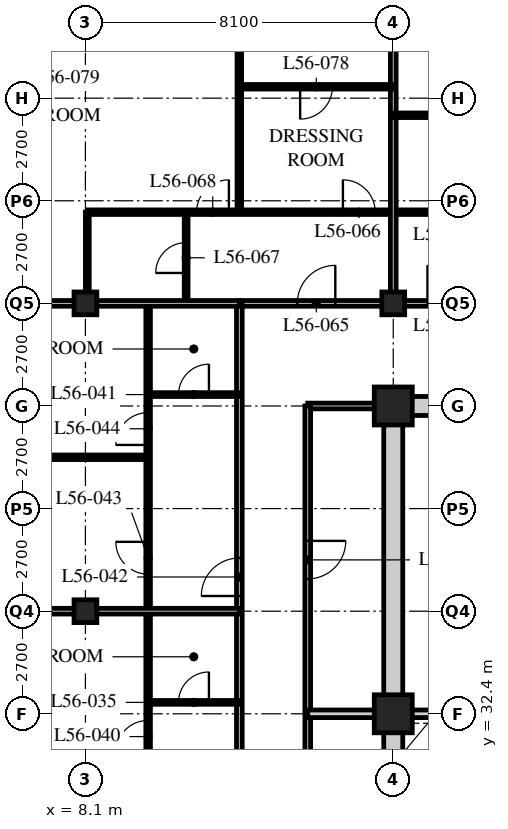
"""IFC4 building model, lengths in metres.
Left out: names, types, materials, properties, quantities, classifications, styles, units other than length and angle.
Written with IfcOpenShell. Run it as: python <this file> out.ifc"""

import sys

from ifc_helpers import new_model, si_unit, direction, frame, frame_2d, origin, origin_2d, place, context, subcontext, project, spatial, rectangle, hollow_rectangle, extrude, element, fill, save


model = new_model("IFC4")
c1 = context("Model", 3, precision=1e-05, world=origin(), true_north=direction((0.0, 1.0)))
c2 = subcontext(c1, "Body", "Model", "MODEL_VIEW")
j1 = project(units=[si_unit("LENGTHUNIT", "METRE"), si_unit("PLANEANGLEUNIT", "RADIAN")], contexts=[c1])
p1 = place(None, origin())
s1 = spatial("IfcSite", under=j1, at=p1, CompositionType="ELEMENT")
p2 = place(p1, origin())
s2 = spatial("IfcBuilding", under=s1, at=p2, CompositionType="ELEMENT")
p3 = place(p2, frame((0.0, 0.0, 217.2)))
s3 = spatial("IfcBuildingStorey", under=s2, at=p3, CompositionType="ELEMENT", Elevation=217.2)
for number, where, z_axis, x_axis in (
    (1, (8.1, 35.1, 0.0), (0.0, 0.0, 1.0), (1.0, 0.0, 0.0)),
    (2, (8.1, 43.2, 0.0), (0.0, 0.0, 1.0), (1.0, 0.0, 0.0)),
):
    element("IfcColumn", number, at=place(p3, frame(where, z_axis=z_axis, x_axis=x_axis)), inside=s3, PredefinedType="COLUMN", context=c2, shape_type="SweptSolid", body=[
        extrude(hollow_rectangle(XDim=0.6, YDim=0.6, WallThickness=0.05, at=origin_2d()), origin(), (0.0, 0.0, 1.0), 3.6),
    ])
for number, where, z_axis, x_axis in (
    (3, (16.2, 32.4, 0.0), (0.0, 0.0, 1.0), (1.0, 0.0, 0.0)),
    (4, (16.2, 40.5, 0.0), (0.0, 0.0, 1.0), (1.0, 0.0, 0.0)),
):
    element("IfcColumn", number, at=place(p3, frame(where, z_axis=z_axis, x_axis=x_axis)), inside=s3, PredefinedType="COLUMN", context=c2, shape_type="SweptSolid", body=[
        extrude(hollow_rectangle(XDim=1.0, YDim=1.0, WallThickness=0.1, at=origin_2d()), origin(), (0.0, 0.0, 1.0), 3.6),
    ])
p4 = place(p3, frame((16.2, 43.2, 0.0), z_axis=(0.0, 0.0, 1.0), x_axis=(1.0, 0.0, 0.0)))
e5 = element("IfcColumn", 5, at=p4, inside=s3, PredefinedType="COLUMN", context=c2, shape_type="SweptSolid", body=[
    extrude(hollow_rectangle(XDim=0.6, YDim=0.6, WallThickness=0.05, at=origin_2d()), origin(), (0.0, 0.0, 1.0), 3.6),
])
p5 = place(p3, frame((12.15, 43.2, 0.0), z_axis=(0.0, 0.0, 1.0), x_axis=(1.0, 0.0, 0.0)))
e6 = element("IfcWall", 6, at=p5, inside=s3, PredefinedType="PARTITIONING", context=c2, shape_type="SweptSolid", body=[
    extrude(rectangle(XDim=36.45, YDim=0.15, at=frame_2d((18.225, 0.0))), origin(), (0.0, 0.0, 1.0), 2.778),
])
p6 = place(p5, frame((4.95, 0.0, 0.0)))
e7 = element("IfcOpeningElement", 7, at=p6, cuts=e6, PredefinedType="OPENING", context=c2, shape_type="SweptSolid", body=[
    extrude(rectangle(XDim=1.0, YDim=2.1, at=frame_2d((0.5, 1.05))), frame((0.0, 0.085, 0.0), z_axis=(0.0, -1.0, 0.0), x_axis=(1.0, 0.0, 0.0)), (0.0, 0.0, 1.0), 0.17),
])
p7 = place(p5, frame((25.0, 0.0, 0.0)))
e8 = element("IfcOpeningElement", 8, at=p7, cuts=e6, PredefinedType="OPENING", context=c2, shape_type="SweptSolid", body=[
    extrude(rectangle(XDim=1.0, YDim=2.1, at=frame_2d((0.5, 1.05))), frame((0.0, 0.085, 0.0), z_axis=(0.0, -1.0, 0.0), x_axis=(1.0, 0.0, 0.0)), (0.0, 0.0, 1.0), 0.17),
])
p8 = place(p5, frame((30.7, 0.0, 0.0)))
e9 = element("IfcOpeningElement", 9, at=p8, cuts=e6, PredefinedType="OPENING", context=c2, shape_type="SweptSolid", body=[
    extrude(rectangle(XDim=1.0, YDim=2.1, at=frame_2d((0.5, 1.05))), frame((0.0, 0.085, 0.0), z_axis=(0.0, -1.0, 0.0), x_axis=(1.0, 0.0, 0.0)), (0.0, 0.0, 1.0), 0.17),
])
p9 = place(p5, frame((33.925, 0.0, 0.0)))
e10 = element("IfcOpeningElement", 10, at=p9, cuts=e6, PredefinedType="OPENING", context=c2, shape_type="SweptSolid", body=[
    extrude(rectangle(XDim=1.0, YDim=2.1, at=frame_2d((0.5, 1.05))), frame((0.0, 0.085, 0.0), z_axis=(0.0, -1.0, 0.0), x_axis=(1.0, 0.0, 0.0)), (0.0, 0.0, 1.0), 0.17),
])
p10 = place(p5, frame((1.525, 0.0, 0.0)))
e11 = element("IfcOpeningElement", 11, at=p10, cuts=e6, PredefinedType="OPENING", context=c2, shape_type="SweptSolid", body=[
    extrude(rectangle(XDim=1.0, YDim=2.1, at=frame_2d((0.5, 1.05))), frame((0.0, 0.085, 0.0), z_axis=(0.0, -1.0, 0.0), x_axis=(1.0, 0.0, 0.0)), (0.0, 0.0, 1.0), 0.17),
])
p11 = place(p3, frame((12.15, 18.9, 0.0), z_axis=(0.0, 0.0, 1.0), x_axis=(0.0, 1.0, 0.0)))
e12 = element("IfcWall", 12, at=p11, inside=s3, PredefinedType="PARTITIONING", context=c2, shape_type="SweptSolid", body=[
    extrude(rectangle(XDim=24.3, YDim=0.15, at=frame_2d((12.15, 0.0))), origin(), (0.0, 0.0, 1.0), 3.39),
])
p12 = place(p11, frame((0.4, 0.0, 0.0)))
e13 = element("IfcOpeningElement", 13, at=p12, cuts=e12, PredefinedType="OPENING", context=c2, shape_type="SweptSolid", body=[
    extrude(rectangle(XDim=1.0, YDim=2.1, at=frame_2d((0.5, 1.05))), frame((0.0, 0.085, 0.0), z_axis=(0.0, -1.0, 0.0), x_axis=(1.0, 0.0, 0.0)), (0.0, 0.0, 1.0), 0.17),
])
p13 = place(p11, frame((16.6, 0.0, 0.0)))
e14 = element("IfcOpeningElement", 14, at=p13, cuts=e12, PredefinedType="OPENING", context=c2, shape_type="SweptSolid", body=[
    extrude(rectangle(XDim=1.0, YDim=2.1, at=frame_2d((0.5, 1.05))), frame((0.0, 0.085, 0.0), z_axis=(0.0, -1.0, 0.0), x_axis=(1.0, 0.0, 0.0)), (0.0, 0.0, 1.0), 0.17),
])
p14 = place(p3, frame((16.0, 40.5, 0.0), z_axis=(0.0, 0.0, 1.0), x_axis=(-1.0, 0.0, 0.0)))
e15 = element("IfcWall", 15, at=p14, inside=s3, PredefinedType="PARTITIONING", context=c2, shape_type="SweptSolid", body=[
    extrude(rectangle(XDim=2.05, YDim=0.15, at=frame_2d((1.025, 0.0))), origin(), (0.0, 0.0, 1.0), 3.39),
])
p15 = place(p3, frame((13.95, 40.5, 0.0), z_axis=(0.0, 0.0, 1.0), x_axis=(0.0, -1.0, 0.0)))
e16 = element("IfcWall", 16, at=p15, inside=s3, PredefinedType="PARTITIONING", context=c2, shape_type="SweptSolid", body=[
    extrude(rectangle(XDim=19.8, YDim=0.15, at=frame_2d((9.9, 0.0))), origin(), (0.0, 0.0, 1.0), 3.39),
])
p16 = place(p15, frame((11.65, 0.0, 0.0)))
e17 = element("IfcOpeningElement", 17, at=p16, cuts=e16, PredefinedType="OPENING", context=c2, shape_type="SweptSolid", body=[
    extrude(rectangle(XDim=1.0, YDim=2.1, at=frame_2d((0.5, 1.05))), frame((0.0, 0.085, 0.0), z_axis=(0.0, -1.0, 0.0), x_axis=(1.0, 0.0, 0.0)), (0.0, 0.0, 1.0), 0.17),
])
p17 = place(p15, frame((3.55, 0.0, 0.0)))
e18 = element("IfcOpeningElement", 18, at=p17, cuts=e16, PredefinedType="OPENING", context=c2, shape_type="SweptSolid", body=[
    extrude(rectangle(XDim=1.0, YDim=2.1, at=frame_2d((0.5, 1.05))), frame((0.0, 0.085, 0.0), z_axis=(0.0, -1.0, 0.0), x_axis=(1.0, 0.0, 0.0)), (0.0, 0.0, 1.0), 0.17),
])
p18 = place(p3, frame((13.95, 32.4, 0.0), z_axis=(0.0, 0.0, 1.0), x_axis=(1.0, 0.0, 0.0)))
e19 = element("IfcWall", 19, at=p18, inside=s3, PredefinedType="SOLIDWALL", context=c2, shape_type="SweptSolid", body=[
    extrude(rectangle(XDim=2.25, YDim=0.2, at=frame_2d((1.125, 0.0))), origin(), (0.0, 0.0, 1.0), 3.39),
])
p19 = place(p3, frame((9.75, 18.9, 0.0), z_axis=(0.0, 0.0, 1.0), x_axis=(0.0, 1.0, 0.0)))
e20 = element("IfcWall", 20, at=p19, inside=s3, PredefinedType="PARTITIONING", context=c2, shape_type="SweptSolid", body=[
    extrude(rectangle(XDim=24.3, YDim=0.12, at=frame_2d((12.15, 0.0))), origin(), (0.0, 0.0, 1.0), 3.39),
])
p20 = place(p19, frame((0.975, 0.0, 0.0)))
e21 = element("IfcOpeningElement", 21, at=p20, cuts=e20, PredefinedType="OPENING", context=c2, shape_type="SweptSolid", body=[
    extrude(rectangle(XDim=0.85, YDim=2.1, at=frame_2d((0.425, 1.05))), frame((0.0, 0.07, 0.0), z_axis=(0.0, -1.0, 0.0), x_axis=(1.0, 0.0, 0.0)), (0.0, 0.0, 1.0), 0.14),
])
p21 = place(p19, frame((8.425, 0.0, 0.0)))
e22 = element("IfcOpeningElement", 22, at=p21, cuts=e20, PredefinedType="OPENING", context=c2, shape_type="SweptSolid", body=[
    extrude(rectangle(XDim=0.85, YDim=2.1, at=frame_2d((0.425, 1.05))), frame((0.0, 0.07, 0.0), z_axis=(0.0, -1.0, 0.0), x_axis=(1.0, 0.0, 0.0)), (0.0, 0.0, 1.0), 0.14),
])
p22 = place(p19, frame((12.475, 0.0, 0.0)))
e23 = element("IfcOpeningElement", 23, at=p22, cuts=e20, PredefinedType="OPENING", context=c2, shape_type="SweptSolid", body=[
    extrude(rectangle(XDim=0.85, YDim=2.1, at=frame_2d((0.425, 1.05))), frame((0.0, 0.07, 0.0), z_axis=(0.0, -1.0, 0.0), x_axis=(1.0, 0.0, 0.0)), (0.0, 0.0, 1.0), 0.14),
])
p23 = place(p19, frame((17.175, 0.0, 0.0)))
e24 = element("IfcOpeningElement", 24, at=p23, cuts=e20, PredefinedType="OPENING", context=c2, shape_type="SweptSolid", body=[
    extrude(rectangle(XDim=0.85, YDim=2.1, at=frame_2d((0.425, 1.05))), frame((0.0, 0.07, 0.0), z_axis=(0.0, -1.0, 0.0), x_axis=(1.0, 0.0, 0.0)), (0.0, 0.0, 1.0), 0.14),
])
p24 = place(p19, frame((20.575, 0.0, 0.0)))
e25 = element("IfcOpeningElement", 25, at=p24, cuts=e20, PredefinedType="OPENING", context=c2, shape_type="SweptSolid", body=[
    extrude(rectangle(XDim=0.85, YDim=2.1, at=frame_2d((0.425, 1.05))), frame((0.0, 0.07, 0.0), z_axis=(0.0, -1.0, 0.0), x_axis=(1.0, 0.0, 0.0)), (0.0, 0.0, 1.0), 0.14),
])
p25 = place(p3, frame((12.15, 32.7, 0.0), z_axis=(0.0, 0.0, 1.0), x_axis=(-1.0, 0.0, 0.0)))
e26 = element("IfcWall", 26, at=p25, inside=s3, PredefinedType="PARTITIONING", context=c2, shape_type="SweptSolid", body=[
    extrude(rectangle(XDim=2.4, YDim=0.1, at=frame_2d((1.2, 0.0))), origin(), (0.0, 0.0, 1.0), 3.39),
])
p26 = place(p25, frame((0.8, 0.0, 0.0)))
e27 = element("IfcOpeningElement", 27, at=p26, cuts=e26, PredefinedType="OPENING", context=c2, shape_type="SweptSolid", body=[
    extrude(rectangle(XDim=0.8, YDim=2.1, at=frame_2d((0.4, 1.05))), frame((0.0, 0.06, 0.0), z_axis=(0.0, -1.0, 0.0), x_axis=(1.0, 0.0, 0.0)), (0.0, 0.0, 1.0), 0.12),
])
p27 = place(p3, frame((12.15, 35.1, 0.0), z_axis=(0.0, 0.0, 1.0), x_axis=(-1.0, 0.0, 0.0)))
e28 = element("IfcWall", 28, at=p27, inside=s3, PredefinedType="PARTITIONING", context=c2, shape_type="SweptSolid", body=[
    extrude(rectangle(XDim=11.85, YDim=0.15, at=frame_2d((5.925, 0.0))), origin(), (0.0, 0.0, 1.0), 2.778),
])
p28 = place(p3, frame((12.15, 40.8, 0.0), z_axis=(0.0, 0.0, 1.0), x_axis=(-1.0, 0.0, 0.0)))
e29 = element("IfcWall", 29, at=p28, inside=s3, PredefinedType="PARTITIONING", context=c2, shape_type="SweptSolid", body=[
    extrude(rectangle(XDim=2.4, YDim=0.1, at=frame_2d((1.2, 0.0))), origin(), (0.0, 0.0, 1.0), 3.39),
])
p29 = place(p28, frame((0.8, 0.0, 0.0)))
e30 = element("IfcOpeningElement", 30, at=p29, cuts=e29, PredefinedType="OPENING", context=c2, shape_type="SweptSolid", body=[
    extrude(rectangle(XDim=0.8, YDim=2.1, at=frame_2d((0.4, 1.05))), frame((0.0, 0.06, 0.0), z_axis=(0.0, -1.0, 0.0), x_axis=(1.0, 0.0, 0.0)), (0.0, 0.0, 1.0), 0.12),
])
p30 = place(p3, frame((9.75, 39.15, 0.0), z_axis=(0.0, 0.0, 1.0), x_axis=(-1.0, 0.0, 0.0)))
e31 = element("IfcWall", 31, at=p30, inside=s3, PredefinedType="PARTITIONING", context=c2, shape_type="SweptSolid", body=[
    extrude(rectangle(XDim=9.45, YDim=0.12, at=frame_2d((4.725, 0.0))), origin(), (0.0, 0.0, 1.0), 3.39),
])
p31 = place(p3, frame((10.75, 43.2, 0.0), z_axis=(0.0, 0.0, 1.0), x_axis=(0.0, 1.0, 0.0)))
e32 = element("IfcWall", 32, at=p31, inside=s3, PredefinedType="PARTITIONING", context=c2, shape_type="SweptSolid", body=[
    extrude(rectangle(XDim=2.4, YDim=0.1, at=frame_2d((1.2, 0.0))), origin(), (0.0, 0.0, 1.0), 3.39),
])
p32 = place(p31, frame((0.8, 0.0, 0.0)))
e33 = element("IfcOpeningElement", 33, at=p32, cuts=e32, PredefinedType="OPENING", context=c2, shape_type="SweptSolid", body=[
    extrude(rectangle(XDim=0.8, YDim=2.1, at=frame_2d((0.4, 1.05))), frame((0.0, 0.06, 0.0), z_axis=(0.0, -1.0, 0.0), x_axis=(1.0, 0.0, 0.0)), (0.0, 0.0, 1.0), 0.12),
])
p33 = place(p3, frame((8.15, 43.2, 0.0), z_axis=(0.0, 0.0, 1.0), x_axis=(0.0, 1.0, 0.0)))
e34 = element("IfcWall", 34, at=p33, inside=s3, PredefinedType="PARTITIONING", context=c2, shape_type="SweptSolid", body=[
    extrude(rectangle(XDim=2.4, YDim=0.1, at=frame_2d((1.2, 0.0))), origin(), (0.0, 0.0, 1.0), 2.778),
])
p34 = place(p3, frame((8.15, 45.6, 0.0), z_axis=(0.0, 0.0, 1.0), x_axis=(1.0, 0.0, 0.0)))
e35 = element("IfcWall", 35, at=p34, inside=s3, PredefinedType="PARTITIONING", context=c2, shape_type="SweptSolid", body=[
    extrude(rectangle(XDim=28.3, YDim=0.12, at=frame_2d((14.15, 0.0))), origin(), (0.0, 0.0, 1.0), 3.39),
])
p35 = place(p34, frame((9.025, 0.0, 0.0)))
e36 = element("IfcOpeningElement", 36, at=p35, cuts=e35, PredefinedType="OPENING", context=c2, shape_type="SweptSolid", body=[
    extrude(rectangle(XDim=0.85, YDim=2.1, at=frame_2d((0.425, 1.05))), frame((0.0, 0.07, 0.0), z_axis=(0.0, -1.0, 0.0), x_axis=(1.0, 0.0, 0.0)), (0.0, 0.0, 1.0), 0.14),
])
p36 = place(p34, frame((16.475, 0.0, 0.0)))
e37 = element("IfcOpeningElement", 37, at=p36, cuts=e35, PredefinedType="OPENING", context=c2, shape_type="SweptSolid", body=[
    extrude(rectangle(XDim=0.85, YDim=2.1, at=frame_2d((0.425, 1.05))), frame((0.0, 0.07, 0.0), z_axis=(0.0, -1.0, 0.0), x_axis=(1.0, 0.0, 0.0)), (0.0, 0.0, 1.0), 0.14),
])
p37 = place(p34, frame((20.525, 0.0, 0.0)))
e38 = element("IfcOpeningElement", 38, at=p37, cuts=e35, PredefinedType="OPENING", context=c2, shape_type="SweptSolid", body=[
    extrude(rectangle(XDim=0.85, YDim=2.1, at=frame_2d((0.425, 1.05))), frame((0.0, 0.07, 0.0), z_axis=(0.0, -1.0, 0.0), x_axis=(1.0, 0.0, 0.0)), (0.0, 0.0, 1.0), 0.14),
])
p38 = place(p34, frame((24.575, 0.0, 0.0)))
e39 = element("IfcOpeningElement", 39, at=p38, cuts=e35, PredefinedType="OPENING", context=c2, shape_type="SweptSolid", body=[
    extrude(rectangle(XDim=0.85, YDim=2.1, at=frame_2d((0.425, 1.05))), frame((0.0, 0.07, 0.0), z_axis=(0.0, -1.0, 0.0), x_axis=(1.0, 0.0, 0.0)), (0.0, 0.0, 1.0), 0.14),
])
p39 = place(p34, frame((6.725, 0.0, 0.0)))
e40 = element("IfcOpeningElement", 40, at=p39, cuts=e35, PredefinedType="OPENING", context=c2, shape_type="SweptSolid", body=[
    extrude(rectangle(XDim=0.85, YDim=2.1, at=frame_2d((0.425, 1.05))), frame((0.0, 0.07, 0.0), z_axis=(0.0, -1.0, 0.0), x_axis=(1.0, 0.0, 0.0)), (0.0, 0.0, 1.0), 0.14),
])
p40 = place(p34, frame((2.875, 0.0, 0.0)))
e41 = element("IfcOpeningElement", 41, at=p40, cuts=e35, PredefinedType="OPENING", context=c2, shape_type="SweptSolid", body=[
    extrude(rectangle(XDim=0.85, YDim=2.1, at=frame_2d((0.425, 1.05))), frame((0.0, 0.07, 0.0), z_axis=(0.0, -1.0, 0.0), x_axis=(1.0, 0.0, 0.0)), (0.0, 0.0, 1.0), 0.14),
])
p41 = place(p3, frame((12.15, 45.6, 0.0), z_axis=(0.0, 0.0, 1.0), x_axis=(0.0, 1.0, 0.0)))
e42 = element("IfcWall", 42, at=p41, inside=s3, PredefinedType="PARTITIONING", context=c2, shape_type="SweptSolid", body=[
    extrude(rectangle(XDim=13.5, YDim=0.12, at=frame_2d((6.75, 0.0))), origin(), (0.0, 0.0, 1.0), 3.39),
])
p42 = place(p3, frame((0.3, 43.2, 0.0), z_axis=(0.0, 0.0, 1.0), x_axis=(1.0, 0.0, 0.0)))
e43 = element("IfcWall", 43, at=p42, inside=s3, PredefinedType="PARTITIONING", context=c2, shape_type="SweptSolid", body=[
    extrude(rectangle(XDim=11.85, YDim=0.15, at=frame_2d((5.925, 0.0))), origin(), (0.0, 0.0, 1.0), 2.778),
])
p43 = place(p3, frame((16.2, 43.2, 0.0), z_axis=(0.0, 0.0, 1.0), x_axis=(0.0, 1.0, 0.0)))
e44 = element("IfcWall", 44, at=p43, inside=s3, PredefinedType="PARTITIONING", context=c2, shape_type="SweptSolid", body=[
    extrude(rectangle(XDim=15.9, YDim=0.15, at=frame_2d((7.95, 0.0))), origin(), (0.0, 0.0, 1.0), 2.778),
])
p44 = place(p3, frame((16.2, 48.15, 0.0), z_axis=(0.0, 0.0, 1.0), x_axis=(1.0, 0.0, 0.0)))
e45 = element("IfcWall", 45, at=p44, inside=s3, PredefinedType="PARTITIONING", context=c2, shape_type="SweptSolid", body=[
    extrude(rectangle(XDim=8.1, YDim=0.12, at=frame_2d((4.05, 0.0))), origin(), (0.0, 0.0, 1.0), 3.39),
])
p45 = place(p44, frame((3.625, 0.0, 0.0)))
e46 = element("IfcOpeningElement", 46, at=p45, cuts=e45, PredefinedType="OPENING", context=c2, shape_type="SweptSolid", body=[
    extrude(rectangle(XDim=0.85, YDim=2.1, at=frame_2d((0.425, 1.05))), frame((0.0, 0.07, 0.0), z_axis=(0.0, -1.0, 0.0), x_axis=(1.0, 0.0, 0.0)), (0.0, 0.0, 1.0), 0.14),
])
p46 = place(p3, frame((12.15, 48.9, 0.0), z_axis=(0.0, 0.0, 1.0), x_axis=(1.0, 0.0, 0.0)))
e47 = element("IfcWall", 47, at=p46, inside=s3, PredefinedType="PARTITIONING", context=c2, shape_type="SweptSolid", body=[
    extrude(rectangle(XDim=4.05, YDim=0.12, at=frame_2d((2.025, 0.0))), origin(), (0.0, 0.0, 1.0), 3.39),
])
p47 = place(p46, frame((1.6, 0.0, 0.0)))
e48 = element("IfcOpeningElement", 48, at=p47, cuts=e47, PredefinedType="OPENING", context=c2, shape_type="SweptSolid", body=[
    extrude(rectangle(XDim=0.85, YDim=2.1, at=frame_2d((0.425, 1.05))), frame((0.0, 0.07, 0.0), z_axis=(0.0, -1.0, 0.0), x_axis=(1.0, 0.0, 0.0)), (0.0, 0.0, 1.0), 0.14),
])
p48 = place(p3, frame((15.95, 40.5, 0.0), z_axis=(0.0, 0.0, 1.0), x_axis=(1.0, 0.0, 0.0)))
e49 = element("IfcWall", 49, at=p48, inside=s3, PredefinedType="SOLIDWALL", context=c2, shape_type="SweptSolid", body=[
    extrude(rectangle(XDim=24.8, YDim=0.5, at=frame_2d((12.4, 0.0))), origin(), (0.0, 0.0, 1.0), 2.74),
])
p49 = place(p48, frame((11.5, 0.0, 0.0)))
e50 = element("IfcOpeningElement", 50, at=p49, cuts=e49, PredefinedType="OPENING", context=c2, shape_type="SweptSolid", body=[
    extrude(rectangle(XDim=1.8, YDim=2.4, at=frame_2d((0.9, 1.2))), frame((0.0, 0.26, 0.0), z_axis=(0.0, -1.0, 0.0), x_axis=(1.0, 0.0, 0.0)), (0.0, 0.0, 1.0), 0.52),
])
p50 = place(p3, frame((16.2, 24.55, 0.0), z_axis=(0.0, 0.0, 1.0), x_axis=(0.0, 1.0, 0.0)))
e51 = element("IfcWall", 51, at=p50, inside=s3, PredefinedType="SOLIDWALL", context=c2, shape_type="SweptSolid", body=[
    extrude(rectangle(XDim=15.7, YDim=0.5, at=frame_2d((7.85, 0.0))), origin(), (0.0, 0.0, 1.0), 2.778),
])
p51 = place(p3, frame((16.45, 32.4, 0.0), z_axis=(0.0, 0.0, 1.0), x_axis=(1.0, 0.0, 0.0)))
e52 = element("IfcWall", 52, at=p51, inside=s3, PredefinedType="SOLIDWALL", context=c2, shape_type="SweptSolid", body=[
    extrude(rectangle(XDim=7.95, YDim=0.2, at=frame_2d((3.975, 0.0))), origin(), (0.0, 0.0, 1.0), 2.778),
])
p52 = place(p17, origin())
e53 = element("IfcDoor", 53, at=p52, inside=s3, OperationType="SINGLE_SWING_LEFT", PredefinedType="DOOR", context=c2, shape_type="SweptSolid", body=[
    extrude(rectangle(XDim=1.0, YDim=2.1, at=frame_2d((0.5, 1.05))), frame((0.0, 0.025, 0.0), z_axis=(0.0, -1.0, 0.0), x_axis=(1.0, 0.0, 0.0)), (0.0, 0.0, 1.0), 0.05),
])
fill(e18, e53)
p53 = place(p6, origin())
e54 = element("IfcDoor", 54, at=p53, inside=s3, OperationType="SINGLE_SWING_LEFT", PredefinedType="DOOR", context=c2, shape_type="SweptSolid", body=[
    extrude(rectangle(XDim=1.0, YDim=2.1, at=frame_2d((0.5, 1.05))), frame((0.0, 0.025, 0.0), z_axis=(0.0, -1.0, 0.0), x_axis=(1.0, 0.0, 0.0)), (0.0, 0.0, 1.0), 0.05),
])
fill(e7, e54)
p54 = place(p26, origin())
e55 = element("IfcDoor", 55, at=p54, inside=s3, OperationType="SINGLE_SWING_RIGHT", PredefinedType="DOOR", context=c2, shape_type="SweptSolid", body=[
    extrude(rectangle(XDim=0.8, YDim=2.1, at=frame_2d((0.4, 1.05))), frame((0.0, 0.025, 0.0), z_axis=(0.0, -1.0, 0.0), x_axis=(1.0, 0.0, 0.0)), (0.0, 0.0, 1.0), 0.05),
])
fill(e27, e55)
p55 = place(p22, origin())
e56 = element("IfcDoor", 56, at=p55, inside=s3, OperationType="SINGLE_SWING_LEFT", PredefinedType="DOOR", context=c2, shape_type="SweptSolid", body=[
    extrude(rectangle(XDim=0.85, YDim=2.1, at=frame_2d((0.425, 1.05))), frame((0.0, 0.025, 0.0), z_axis=(0.0, -1.0, 0.0), x_axis=(1.0, 0.0, 0.0)), (0.0, 0.0, 1.0), 0.05),
])
fill(e23, e56)
p56 = place(p29, origin())
e57 = element("IfcDoor", 57, at=p56, inside=s3, OperationType="SINGLE_SWING_RIGHT", PredefinedType="DOOR", context=c2, shape_type="SweptSolid", body=[
    extrude(rectangle(XDim=0.8, YDim=2.1, at=frame_2d((0.4, 1.05))), frame((0.0, 0.025, 0.0), z_axis=(0.0, -1.0, 0.0), x_axis=(1.0, 0.0, 0.0)), (0.0, 0.0, 1.0), 0.05),
])
fill(e30, e57)
p57 = place(p13, origin())
e58 = element("IfcDoor", 58, at=p57, inside=s3, OperationType="SINGLE_SWING_LEFT", PredefinedType="DOOR", context=c2, shape_type="SweptSolid", body=[
    extrude(rectangle(XDim=1.0, YDim=2.1, at=frame_2d((0.5, 1.05))), frame((0.0, 0.025, 0.0), z_axis=(0.0, -1.0, 0.0), x_axis=(1.0, 0.0, 0.0)), (0.0, 0.0, 1.0), 0.05),
])
fill(e14, e58)
p58 = place(p23, origin())
e59 = element("IfcDoor", 59, at=p58, inside=s3, OperationType="SINGLE_SWING_RIGHT", PredefinedType="DOOR", context=c2, shape_type="SweptSolid", body=[
    extrude(rectangle(XDim=0.85, YDim=2.1, at=frame_2d((0.425, 1.05))), frame((0.0, 0.025, 0.0), z_axis=(0.0, -1.0, 0.0), x_axis=(1.0, 0.0, 0.0)), (0.0, 0.0, 1.0), 0.05),
])
fill(e24, e59)
p59 = place(p24, origin())
e60 = element("IfcDoor", 60, at=p59, inside=s3, OperationType="SINGLE_SWING_LEFT", PredefinedType="DOOR", context=c2, shape_type="SweptSolid", body=[
    extrude(rectangle(XDim=0.85, YDim=2.1, at=frame_2d((0.425, 1.05))), frame((0.0, 0.025, 0.0), z_axis=(0.0, -1.0, 0.0), x_axis=(1.0, 0.0, 0.0)), (0.0, 0.0, 1.0), 0.05),
])
fill(e25, e60)
p60 = place(p10, origin())
e61 = element("IfcDoor", 61, at=p60, inside=s3, OperationType="SINGLE_SWING_RIGHT", PredefinedType="DOOR", context=c2, shape_type="SweptSolid", body=[
    extrude(rectangle(XDim=1.0, YDim=2.1, at=frame_2d((0.5, 1.05))), frame((0.0, 0.025, 0.0), z_axis=(0.0, -1.0, 0.0), x_axis=(1.0, 0.0, 0.0)), (0.0, 0.0, 1.0), 0.05),
])
fill(e11, e61)
p61 = place(p39, origin())
e62 = element("IfcDoor", 62, at=p61, inside=s3, OperationType="SINGLE_SWING_LEFT", PredefinedType="DOOR", context=c2, shape_type="SweptSolid", body=[
    extrude(rectangle(XDim=0.85, YDim=2.1, at=frame_2d((0.425, 1.05))), frame((0.0, 0.025, 0.0), z_axis=(0.0, -1.0, 0.0), x_axis=(1.0, 0.0, 0.0)), (0.0, 0.0, 1.0), 0.05),
])
fill(e40, e62)
p62 = place(p32, origin())
e63 = element("IfcDoor", 63, at=p62, inside=s3, OperationType="SINGLE_SWING_LEFT", PredefinedType="DOOR", context=c2, shape_type="SweptSolid", body=[
    extrude(rectangle(XDim=0.8, YDim=2.1, at=frame_2d((0.4, 1.05))), frame((0.0, 0.025, 0.0), z_axis=(0.0, -1.0, 0.0), x_axis=(1.0, 0.0, 0.0)), (0.0, 0.0, 1.0), 0.05),
])
fill(e33, e63)
p63 = place(p40, origin())
e64 = element("IfcDoor", 64, at=p63, inside=s3, OperationType="SINGLE_SWING_RIGHT", PredefinedType="DOOR", context=c2, shape_type="SweptSolid", body=[
    extrude(rectangle(XDim=0.85, YDim=2.1, at=frame_2d((0.425, 1.05))), frame((0.0, 0.025, 0.0), z_axis=(0.0, -1.0, 0.0), x_axis=(1.0, 0.0, 0.0)), (0.0, 0.0, 1.0), 0.05),
])
fill(e41, e64)
p64 = place(p47, origin())
e65 = element("IfcDoor", 65, at=p64, inside=s3, OperationType="SINGLE_SWING_RIGHT", PredefinedType="DOOR", context=c2, shape_type="SweptSolid", body=[
    extrude(rectangle(XDim=0.85, YDim=2.1, at=frame_2d((0.425, 1.05))), frame((0.0, 0.025, 0.0), z_axis=(0.0, -1.0, 0.0), x_axis=(1.0, 0.0, 0.0)), (0.0, 0.0, 1.0), 0.05),
])
fill(e48, e65)
save(model, sys.argv[1])
